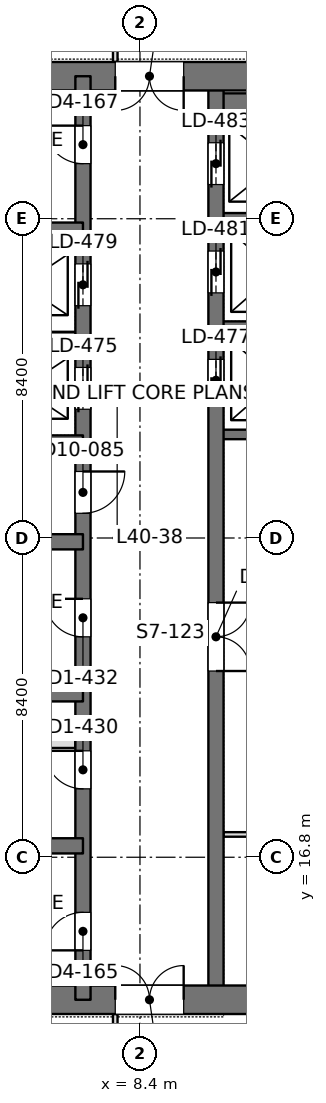
"""IFC4 building model, lengths in metres.
Left out: names, types, materials, properties, quantities, classifications, styles, units other than length and angle.
Written with IfcOpenShell. Run it as: python <this file> out.ifc"""

import sys

from ifc_helpers import new_model, si_unit, direction, frame, frame_2d, origin, place, context, subcontext, project, spatial, rectangle, extrude, element, fill, save


model = new_model("IFC4")
c1 = context("Model", 3, precision=1e-05, world=origin(), true_north=direction((0.0, 1.0)))
c2 = subcontext(c1, "Body", "Model", "MODEL_VIEW")
j1 = project(units=[si_unit("LENGTHUNIT", "METRE"), si_unit("PLANEANGLEUNIT", "RADIAN")], contexts=[c1])
p1 = place(None, origin())
s1 = spatial("IfcSite", under=j1, at=p1, CompositionType="ELEMENT")
p2 = place(p1, origin())
s2 = spatial("IfcBuilding", under=s1, at=p2, CompositionType="ELEMENT")
p3 = place(p2, frame((0.0, 0.0, 177.6)))
s3 = spatial("IfcBuildingStorey", under=s2, at=p3, CompositionType="ELEMENT", Elevation=177.6)
p4 = place(p3, frame((-1.125, 13.05, 0.0), z_axis=(0.0, 0.0, 1.0), x_axis=(1.0, 0.0, 0.0)))
e1 = element("IfcWall", 1, at=p4, inside=s3, PredefinedType="SHEAR", context=c2, shape_type="SweptSolid", body=[
    extrude(rectangle(XDim=17.85, YDim=0.75, at=frame_2d((8.925, 0.0))), origin(), (0.0, 0.0, 1.0), 4.2),
])
p5 = place(p4, frame((8.875, 0.0, 0.0)))
e2 = element("IfcOpeningElement", 2, at=p5, cuts=e1, PredefinedType="OPENING", context=c2, shape_type="SweptSolid", body=[
    extrude(rectangle(XDim=1.8, YDim=2.4, at=frame_2d((0.9, 1.2))), frame((0.0, 0.385, 0.0), z_axis=(0.0, -1.0, 0.0), x_axis=(1.0, 0.0, 0.0)), (0.0, 0.0, 1.0), 0.77),
])
p6 = place(p3, frame((-1.125, 37.35, 0.0), z_axis=(0.0, 0.0, 1.0), x_axis=(1.0, 0.0, 0.0)))
e3 = element("IfcWall", 3, at=p6, inside=s3, PredefinedType="SHEAR", context=c2, shape_type="SweptSolid", body=[
    extrude(rectangle(XDim=17.85, YDim=0.75, at=frame_2d((8.925, 0.0))), origin(), (0.0, 0.0, 1.0), 4.2),
])
p7 = place(p6, frame((8.875, 0.0, 0.0)))
e4 = element("IfcOpeningElement", 4, at=p7, cuts=e3, PredefinedType="OPENING", context=c2, shape_type="SweptSolid", body=[
    extrude(rectangle(XDim=1.8, YDim=2.4, at=frame_2d((0.9, 1.2))), frame((0.0, 0.385, 0.0), z_axis=(0.0, -1.0, 0.0), x_axis=(1.0, 0.0, 0.0)), (0.0, 0.0, 1.0), 0.77),
])
p8 = place(p3, frame((6.9, 13.05, 0.0), z_axis=(0.0, 0.0, 1.0), x_axis=(0.0, 1.0, 0.0)))
e5 = element("IfcWall", 5, at=p8, inside=s3, PredefinedType="SHEAR", context=c2, shape_type="SweptSolid", body=[
    extrude(rectangle(XDim=24.3, YDim=0.4, at=frame_2d((12.15, 0.0))), origin(), (0.0, 0.0, 1.0), 4.2),
])
p9 = place(p8, frame((1.3, 0.0, 0.0)))
e6 = element("IfcOpeningElement", 6, at=p9, cuts=e5, PredefinedType="OPENING", context=c2, shape_type="SweptSolid", body=[
    extrude(rectangle(XDim=1.0, YDim=2.2, at=frame_2d((0.5, 1.1))), frame((0.0, 0.21, 0.0), z_axis=(0.0, -1.0, 0.0), x_axis=(1.0, 0.0, 0.0)), (0.0, 0.0, 1.0), 0.42),
])
p10 = place(p8, frame((22.0, 0.0, 0.0)))
e7 = element("IfcOpeningElement", 7, at=p10, cuts=e5, PredefinedType="OPENING", context=c2, shape_type="SweptSolid", body=[
    extrude(rectangle(XDim=1.0, YDim=2.2, at=frame_2d((0.5, 1.1))), frame((0.0, 0.21, 0.0), z_axis=(0.0, -1.0, 0.0), x_axis=(1.0, 0.0, 0.0)), (0.0, 0.0, 1.0), 0.42),
])
p11 = place(p8, frame((5.55, 0.0, 0.0)))
e8 = element("IfcOpeningElement", 8, at=p11, cuts=e5, PredefinedType="OPENING", context=c2, shape_type="SweptSolid", body=[
    extrude(rectangle(XDim=1.0, YDim=2.2, at=frame_2d((0.5, 1.1))), frame((0.0, 0.21, 0.0), z_axis=(0.0, -1.0, 0.0), x_axis=(1.0, 0.0, 0.0)), (0.0, 0.0, 1.0), 0.42),
])
p12 = place(p8, frame((9.55, 0.0, 0.0)))
e9 = element("IfcOpeningElement", 9, at=p12, cuts=e5, PredefinedType="OPENING", context=c2, shape_type="SweptSolid", body=[
    extrude(rectangle(XDim=1.0, YDim=2.2, at=frame_2d((0.5, 1.1))), frame((0.0, 0.21, 0.0), z_axis=(0.0, -1.0, 0.0), x_axis=(1.0, 0.0, 0.0)), (0.0, 0.0, 1.0), 0.42),
])
p13 = place(p8, frame((12.8, 0.0, 0.0)))
e10 = element("IfcOpeningElement", 10, at=p13, cuts=e5, PredefinedType="OPENING", context=c2, shape_type="SweptSolid", body=[
    extrude(rectangle(XDim=1.1, YDim=2.2, at=frame_2d((0.55, 1.1))), frame((0.0, 0.21, 0.0), z_axis=(0.0, -1.0, 0.0), x_axis=(1.0, 0.0, 0.0)), (0.0, 0.0, 1.0), 0.42),
])
p14 = place(p8, frame((15.538, 0.0, 0.0)))
e11 = element("IfcOpeningElement", 11, at=p14, cuts=e5, PredefinedType="OPENING", context=c2, shape_type="SweptSolid", body=[
    extrude(rectangle(XDim=1.1, YDim=2.2, at=frame_2d((0.55, 1.1))), frame((0.0, 0.21, 0.0), z_axis=(0.0, -1.0, 0.0), x_axis=(1.0, 0.0, 0.0)), (0.0, 0.0, 1.0), 0.42),
])
p15 = place(p8, frame((18.262, 0.0, 0.0)))
e12 = element("IfcOpeningElement", 12, at=p15, cuts=e5, PredefinedType="OPENING", context=c2, shape_type="SweptSolid", body=[
    extrude(rectangle(XDim=1.1, YDim=2.2, at=frame_2d((0.55, 1.1))), frame((0.0, 0.21, 0.0), z_axis=(0.0, -1.0, 0.0), x_axis=(1.0, 0.0, 0.0)), (0.0, 0.0, 1.0), 0.42),
])
p16 = place(p3, frame((10.4, 13.05, 0.0), z_axis=(0.0, 0.0, 1.0), x_axis=(0.0, 1.0, 0.0)))
e13 = element("IfcWall", 13, at=p16, inside=s3, PredefinedType="SHEAR", context=c2, shape_type="SweptSolid", body=[
    extrude(rectangle(XDim=24.3, YDim=0.4, at=frame_2d((12.15, 0.0))), origin(), (0.0, 0.0, 1.0), 4.2),
])
p17 = place(p16, frame((15.75, 0.0, 0.0)))
e14 = element("IfcOpeningElement", 14, at=p17, cuts=e13, PredefinedType="OPENING", context=c2, shape_type="SweptSolid", body=[
    extrude(rectangle(XDim=1.1, YDim=2.2, at=frame_2d((0.55, 1.1))), frame((0.0, 0.21, 0.0), z_axis=(0.0, -1.0, 0.0), x_axis=(1.0, 0.0, 0.0)), (0.0, 0.0, 1.0), 0.42),
])
p18 = place(p16, frame((18.6, 0.0, 0.0)))
e15 = element("IfcOpeningElement", 15, at=p18, cuts=e13, PredefinedType="OPENING", context=c2, shape_type="SweptSolid", body=[
    extrude(rectangle(XDim=1.1, YDim=2.2, at=frame_2d((0.55, 1.1))), frame((0.0, 0.21, 0.0), z_axis=(0.0, -1.0, 0.0), x_axis=(1.0, 0.0, 0.0)), (0.0, 0.0, 1.0), 0.42),
])
p19 = place(p16, frame((21.45, 0.0, 0.0)))
e16 = element("IfcOpeningElement", 16, at=p19, cuts=e13, PredefinedType="OPENING", context=c2, shape_type="SweptSolid", body=[
    extrude(rectangle(XDim=1.1, YDim=2.2, at=frame_2d((0.55, 1.1))), frame((0.0, 0.21, 0.0), z_axis=(0.0, -1.0, 0.0), x_axis=(1.0, 0.0, 0.0)), (0.0, 0.0, 1.0), 0.42),
])
p20 = place(p16, frame((8.65, 0.0, 0.0)))
e17 = element("IfcOpeningElement", 17, at=p20, cuts=e13, PredefinedType="OPENING", context=c2, shape_type="SweptSolid", body=[
    extrude(rectangle(XDim=1.8, YDim=2.4, at=frame_2d((0.9, 1.2))), frame((0.0, 0.21, 0.0), z_axis=(0.0, -1.0, 0.0), x_axis=(1.0, 0.0, 0.0)), (0.0, 0.0, 1.0), 0.42),
])
for number, where, z_axis, x_axis in (
    (18, (-0.75, 17.1, 0.0), (0.0, 0.0, 1.0), (1.0, 0.0, 0.0)),
    (19, (-0.75, 21.1, 0.0), (0.0, 0.0, 1.0), (1.0, 0.0, 0.0)),
    (20, (-0.75, 25.1, 0.0), (0.0, 0.0, 1.0), (1.0, 0.0, 0.0)),
    (21, (-0.75, 27.7, 0.0), (0.0, 0.0, 1.0), (1.0, 0.0, 0.0)),
    (22, (-0.75, 33.3, 0.0), (0.0, 0.0, 1.0), (1.0, 0.0, 0.0)),
):
    element("IfcWall", number, at=place(p3, frame(where, z_axis=z_axis, x_axis=x_axis)), inside=s3, PredefinedType="SHEAR", context=c2, shape_type="SweptSolid", body=[
        extrude(rectangle(XDim=7.65, YDim=0.4, at=frame_2d((3.825, 0.0))), origin(), (0.0, 0.0, 1.0), 4.2),
    ])
p21 = place(p3, frame((3.7, 30.5, 0.0), z_axis=(0.0, 0.0, 1.0), x_axis=(1.0, 0.0, 0.0)))
e23 = element("IfcWall", 23, at=p21, inside=s3, PredefinedType="SHEAR", context=c2, shape_type="SweptSolid", body=[
    extrude(rectangle(XDim=3.2, YDim=0.25, at=frame_2d((1.6, 0.0))), origin(), (0.0, 0.0, 1.0), 4.2),
])
p22 = place(p3, frame((10.4, 27.925, 0.0), z_axis=(0.0, 0.0, 1.0), x_axis=(1.0, 0.0, 0.0)))
e24 = element("IfcWall", 24, at=p22, inside=s3, PredefinedType="SHEAR", context=c2, shape_type="SweptSolid", body=[
    extrude(rectangle(XDim=5.95, YDim=0.25, at=frame_2d((2.975, 0.0))), origin(), (0.0, 0.0, 1.0), 4.2),
])
for number, where, z_axis, x_axis in (
    (25, (10.4, 30.775, 0.0), (0.0, 0.0, 1.0), (1.0, 0.0, 0.0)),
    (26, (10.4, 33.625, 0.0), (0.0, 0.0, 1.0), (1.0, 0.0, 0.0)),
):
    element("IfcWall", number, at=place(p3, frame(where, z_axis=z_axis, x_axis=x_axis)), inside=s3, PredefinedType="SHEAR", context=c2, shape_type="SweptSolid", body=[
        extrude(rectangle(XDim=3.2, YDim=0.25, at=frame_2d((1.6, 0.0))), origin(), (0.0, 0.0, 1.0), 4.2),
    ])
p23 = place(p3, frame((10.4, 36.625, 0.0), z_axis=(0.0, 0.0, 1.0), x_axis=(1.0, 0.0, 0.0)))
e27 = element("IfcWall", 27, at=p23, inside=s3, PredefinedType="SHEAR", context=c2, shape_type="SweptSolid", body=[
    extrude(rectangle(XDim=3.2, YDim=0.55, at=frame_2d((1.6, 0.0))), origin(), (0.0, 0.0, 1.0), 4.2),
])
p24 = place(p3, frame((10.598, 17.4, 0.0), z_axis=(0.0, 0.0, 1.0), x_axis=(1.0, 0.0, 0.0)))
e28 = element("IfcWall", 28, at=p24, inside=s3, PredefinedType="PARTITIONING", context=c2, shape_type="SweptSolid", body=[
    extrude(rectangle(XDim=5.904, YDim=0.12, at=frame_2d((2.952, 0.0))), origin(), (0.0, 0.0, 1.0), 3.55),
])
p25 = place(p3, frame((7.75, 11.158, 0.0), z_axis=(0.0, 0.0, 1.0), x_axis=(0.0, 1.0, 0.0)))
e29 = element("IfcWall", 29, at=p25, inside=s3, PredefinedType="PARTITIONING", context=c2, shape_type="SweptSolid", body=[
    extrude(rectangle(XDim=1.518, YDim=0.12, at=frame_2d((0.759, 0.0))), origin(), (0.0, 0.0, 1.0), 4.05),
])
p26 = place(p25, frame((0.192, 0.0, 0.0)))
e30 = element("IfcOpeningElement", 30, at=p26, cuts=e29, PredefinedType="OPENING", context=c2, shape_type="SweptSolid", body=[
    extrude(rectangle(XDim=1.0, YDim=2.4, at=frame_2d((0.5, 1.2))), frame((0.0, 0.07, 0.0), z_axis=(0.0, -1.0, 0.0), x_axis=(1.0, 0.0, 0.0)), (0.0, 0.0, 1.0), 0.14),
])
p27 = place(p3, frame((7.75, 37.724, 0.0), z_axis=(0.0, 0.0, 1.0), x_axis=(0.0, 1.0, 0.0)))
e31 = element("IfcWall", 31, at=p27, inside=s3, PredefinedType="PARTITIONING", context=c2, shape_type="SweptSolid", body=[
    extrude(rectangle(XDim=1.518, YDim=0.12, at=frame_2d((0.759, 0.0))), origin(), (0.0, 0.0, 1.0), 4.05),
])
p28 = place(p27, frame((0.326, 0.0, 0.0)))
e32 = element("IfcOpeningElement", 32, at=p28, cuts=e31, PredefinedType="OPENING", context=c2, shape_type="SweptSolid", body=[
    extrude(rectangle(XDim=1.0, YDim=2.4, at=frame_2d((0.5, 1.2))), frame((0.0, 0.07, 0.0), z_axis=(0.0, -1.0, 0.0), x_axis=(1.0, 0.0, 0.0)), (0.0, 0.0, 1.0), 0.14),
])
p29 = place(p3, frame((0.025, 19.8, 0.0), z_axis=(0.0, 0.0, 1.0), x_axis=(1.0, 0.0, 0.0)))
e33 = element("IfcWall", 33, at=p29, inside=s3, PredefinedType="PARTITIONING", context=c2, shape_type="SweptSolid", body=[
    extrude(rectangle(XDim=6.675, YDim=0.25, at=frame_2d((3.337, 0.0))), origin(), (0.0, 0.0, 1.0), 4.0),
])
p30 = place(p29, frame((2.913, 0.0, 0.0)))
e34 = element("IfcOpeningElement", 34, at=p30, cuts=e33, PredefinedType="OPENING", context=c2, shape_type="SweptSolid", body=[
    extrude(rectangle(XDim=0.9, YDim=2.2, at=frame_2d((0.45, 1.1))), frame((0.0, 0.135, 0.0), z_axis=(0.0, -1.0, 0.0), x_axis=(1.0, 0.0, 0.0)), (0.0, 0.0, 1.0), 0.27),
])
p31 = place(p5, origin())
e35 = element("IfcDoor", 35, at=p31, inside=s3, OperationType="DOUBLE_DOOR_SINGLE_SWING", PredefinedType="DOOR", context=c2, shape_type="SweptSolid", body=[
    extrude(rectangle(XDim=1.8, YDim=2.4, at=frame_2d((0.9, 1.2))), frame((0.0, 0.025, 0.0), z_axis=(0.0, -1.0, 0.0), x_axis=(1.0, 0.0, 0.0)), (0.0, 0.0, 1.0), 0.05),
])
fill(e2, e35)
p32 = place(p7, frame((1.8, 0.0, 0.0), z_axis=(0.0, 0.0, 1.0), x_axis=(-1.0, 0.0, 0.0)))
e36 = element("IfcDoor", 36, at=p32, inside=s3, OperationType="DOUBLE_DOOR_SINGLE_SWING", PredefinedType="DOOR", context=c2, shape_type="SweptSolid", body=[
    extrude(rectangle(XDim=1.8, YDim=2.4, at=frame_2d((0.9, 1.2))), frame((0.0, 0.025, 0.0), z_axis=(0.0, -1.0, 0.0), x_axis=(1.0, 0.0, 0.0)), (0.0, 0.0, 1.0), 0.05),
])
fill(e4, e36)
p33 = place(p9, origin())
e37 = element("IfcDoor", 37, at=p33, inside=s3, OperationType="SINGLE_SWING_LEFT", PredefinedType="DOOR", context=c2, shape_type="SweptSolid", body=[
    extrude(rectangle(XDim=1.0, YDim=2.2, at=frame_2d((0.5, 1.1))), frame((0.0, 0.025, 0.0), z_axis=(0.0, -1.0, 0.0), x_axis=(1.0, 0.0, 0.0)), (0.0, 0.0, 1.0), 0.05),
])
fill(e6, e37)
p34 = place(p10, origin())
e38 = element("IfcDoor", 38, at=p34, inside=s3, OperationType="SINGLE_SWING_RIGHT", PredefinedType="DOOR", context=c2, shape_type="SweptSolid", body=[
    extrude(rectangle(XDim=1.0, YDim=2.2, at=frame_2d((0.5, 1.1))), frame((0.0, 0.025, 0.0), z_axis=(0.0, -1.0, 0.0), x_axis=(1.0, 0.0, 0.0)), (0.0, 0.0, 1.0), 0.05),
])
fill(e7, e38)
p35 = place(p11, origin())
e39 = element("IfcDoor", 39, at=p35, inside=s3, OperationType="SINGLE_SWING_RIGHT", PredefinedType="DOOR", context=c2, shape_type="SweptSolid", body=[
    extrude(rectangle(XDim=1.0, YDim=2.2, at=frame_2d((0.5, 1.1))), frame((0.0, 0.025, 0.0), z_axis=(0.0, -1.0, 0.0), x_axis=(1.0, 0.0, 0.0)), (0.0, 0.0, 1.0), 0.05),
])
fill(e8, e39)
p36 = place(p12, origin())
e40 = element("IfcDoor", 40, at=p36, inside=s3, OperationType="SINGLE_SWING_RIGHT", PredefinedType="DOOR", context=c2, shape_type="SweptSolid", body=[
    extrude(rectangle(XDim=1.0, YDim=2.2, at=frame_2d((0.5, 1.1))), frame((0.0, 0.025, 0.0), z_axis=(0.0, -1.0, 0.0), x_axis=(1.0, 0.0, 0.0)), (0.0, 0.0, 1.0), 0.05),
])
fill(e9, e40)
p37 = place(p13, frame((1.1, 0.0, 0.0), z_axis=(0.0, 0.0, 1.0), x_axis=(-1.0, 0.0, 0.0)))
e41 = element("IfcDoor", 41, at=p37, inside=s3, OperationType="SINGLE_SWING_LEFT", PredefinedType="DOOR", context=c2, shape_type="SweptSolid", body=[
    extrude(rectangle(XDim=1.1, YDim=2.2, at=frame_2d((0.55, 1.1))), frame((0.0, 0.025, 0.0), z_axis=(0.0, -1.0, 0.0), x_axis=(1.0, 0.0, 0.0)), (0.0, 0.0, 1.0), 0.05),
])
fill(e10, e41)
p38 = place(p17, origin())
e42 = element("IfcDoor", 42, at=p38, inside=s3, OperationType="DOUBLE_DOOR_SLIDING", PredefinedType="DOOR", context=c2, shape_type="SweptSolid", body=[
    extrude(rectangle(XDim=1.1, YDim=2.2, at=frame_2d((0.55, 1.1))), frame((0.0, 0.025, 0.0), z_axis=(0.0, -1.0, 0.0), x_axis=(1.0, 0.0, 0.0)), (0.0, 0.0, 1.0), 0.05),
])
fill(e14, e42)
p39 = place(p18, origin())
e43 = element("IfcDoor", 43, at=p39, inside=s3, OperationType="DOUBLE_DOOR_SLIDING", PredefinedType="DOOR", context=c2, shape_type="SweptSolid", body=[
    extrude(rectangle(XDim=1.1, YDim=2.2, at=frame_2d((0.55, 1.1))), frame((0.0, 0.025, 0.0), z_axis=(0.0, -1.0, 0.0), x_axis=(1.0, 0.0, 0.0)), (0.0, 0.0, 1.0), 0.05),
])
fill(e15, e43)
p40 = place(p19, origin())
e44 = element("IfcDoor", 44, at=p40, inside=s3, OperationType="DOUBLE_DOOR_SLIDING", PredefinedType="DOOR", context=c2, shape_type="SweptSolid", body=[
    extrude(rectangle(XDim=1.1, YDim=2.2, at=frame_2d((0.55, 1.1))), frame((0.0, 0.025, 0.0), z_axis=(0.0, -1.0, 0.0), x_axis=(1.0, 0.0, 0.0)), (0.0, 0.0, 1.0), 0.05),
])
fill(e16, e44)
p41 = place(p14, origin())
e45 = element("IfcDoor", 45, at=p41, inside=s3, OperationType="DOUBLE_DOOR_SLIDING", PredefinedType="DOOR", context=c2, shape_type="SweptSolid", body=[
    extrude(rectangle(XDim=1.1, YDim=2.2, at=frame_2d((0.55, 1.1))), frame((0.0, 0.025, 0.0), z_axis=(0.0, -1.0, 0.0), x_axis=(1.0, 0.0, 0.0)), (0.0, 0.0, 1.0), 0.05),
])
fill(e11, e45)
p42 = place(p15, origin())
e46 = element("IfcDoor", 46, at=p42, inside=s3, OperationType="DOUBLE_DOOR_SLIDING", PredefinedType="DOOR", context=c2, shape_type="SweptSolid", body=[
    extrude(rectangle(XDim=1.1, YDim=2.2, at=frame_2d((0.55, 1.1))), frame((0.0, 0.025, 0.0), z_axis=(0.0, -1.0, 0.0), x_axis=(1.0, 0.0, 0.0)), (0.0, 0.0, 1.0), 0.05),
])
fill(e12, e46)
p43 = place(p20, frame((1.8, 0.0, 0.0), z_axis=(0.0, 0.0, 1.0), x_axis=(-1.0, 0.0, 0.0)))
e47 = element("IfcDoor", 47, at=p43, inside=s3, OperationType="DOUBLE_DOOR_SINGLE_SWING", PredefinedType="DOOR", context=c2, shape_type="SweptSolid", body=[
    extrude(rectangle(XDim=1.8, YDim=2.4, at=frame_2d((0.9, 1.2))), frame((0.0, 0.025, 0.0), z_axis=(0.0, -1.0, 0.0), x_axis=(1.0, 0.0, 0.0)), (0.0, 0.0, 1.0), 0.05),
])
fill(e17, e47)
save(model, sys.argv[1])
